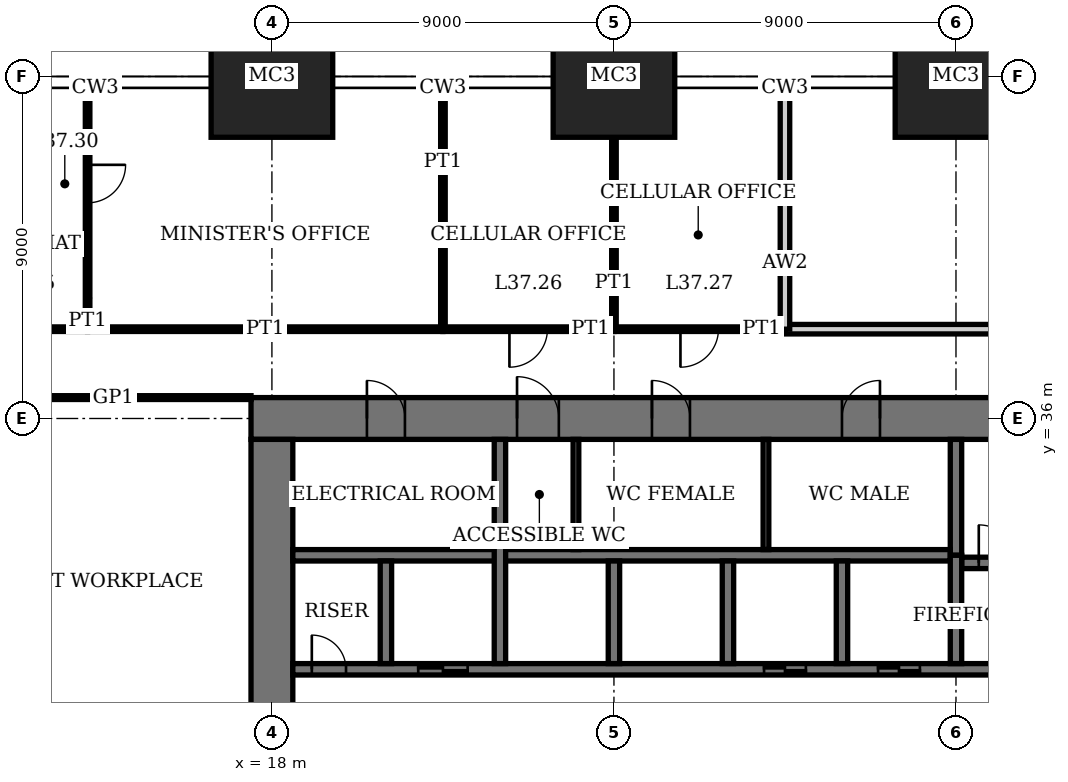
"""IFC4 building model, lengths in metres.
Left out: names, types, materials, properties, quantities, classifications, styles, units other than length and angle.
Written with IfcOpenShell. Run it as: python <this file> out.ifc"""

import sys

from ifc_helpers import new_model, si_unit, direction, frame, frame_2d, origin, origin_2d, place, context, subcontext, project, spatial, rectangle, extrude, element, fill, save


model = new_model("IFC4")
c1 = context("Model", 3, precision=1e-05, world=origin(), true_north=direction((0.0, 1.0)))
c2 = subcontext(c1, "Body", "Model", "MODEL_VIEW")
j1 = project(units=[si_unit("LENGTHUNIT", "METRE"), si_unit("PLANEANGLEUNIT", "RADIAN")], contexts=[c1])
p1 = place(None, origin())
s1 = spatial("IfcSite", under=j1, at=p1, CompositionType="ELEMENT")
p2 = place(p1, origin())
s2 = spatial("IfcBuilding", under=s1, at=p2, CompositionType="ELEMENT")
p3 = place(p2, frame((0.0, 0.0, 153.0)))
s3 = spatial("IfcBuildingStorey", under=s2, at=p3, CompositionType="ELEMENT", Elevation=153.0)
for number, where, z_axis, x_axis in (
    (1, (18.0, 45.0, 0.0), (0.0, 0.0, 1.0), (1.0, 0.0, 0.0)),
    (2, (27.0, 45.0, 0.0), (0.0, 0.0, 1.0), (1.0, 0.0, 0.0)),
    (3, (36.0, 45.0, 0.0), (0.0, 0.0, 1.0), (1.0, 0.0, 0.0)),
):
    element("IfcColumn", number, at=place(p3, frame(where, z_axis=z_axis, x_axis=x_axis)), inside=s3, PredefinedType="COLUMN", context=c2, shape_type="SweptSolid", body=[
        extrude(rectangle(XDim=3.2, YDim=3.2, at=origin_2d()), origin(), (0.0, 0.0, 1.0), 4.2),
    ])
p4 = place(p3, frame((45.55, 36.0, 0.0), z_axis=(0.0, 0.0, 1.0), x_axis=(-1.0, 0.0, 0.0)))
e4 = element("IfcWall", 4, at=p4, inside=s3, PredefinedType="SHEAR", context=c2, shape_type="SweptSolid", body=[
    extrude(rectangle(XDim=28.1, YDim=1.1, at=frame_2d((14.05, 0.0))), origin(), (0.0, 0.0, 1.0), 4.2),
])
p5 = place(p4, frame((11.55, 0.0, 0.0)))
e5 = element("IfcOpeningElement", 5, at=p5, cuts=e4, PredefinedType="OPENING", context=c2, shape_type="SweptSolid", body=[
    extrude(rectangle(XDim=1.0, YDim=2.4, at=frame_2d((0.5, 1.2))), frame((0.0, 0.56, 0.0), z_axis=(0.0, -1.0, 0.0), x_axis=(1.0, 0.0, 0.0)), (0.0, 0.0, 1.0), 1.12),
])
p6 = place(p4, frame((16.55, 0.0, 0.0)))
e6 = element("IfcOpeningElement", 6, at=p6, cuts=e4, PredefinedType="OPENING", context=c2, shape_type="SweptSolid", body=[
    extrude(rectangle(XDim=1.0, YDim=2.4, at=frame_2d((0.5, 1.2))), frame((0.0, 0.56, 0.0), z_axis=(0.0, -1.0, 0.0), x_axis=(1.0, 0.0, 0.0)), (0.0, 0.0, 1.0), 1.12),
])
p7 = place(p4, frame((20.0, 0.0, 0.0)))
e7 = element("IfcOpeningElement", 7, at=p7, cuts=e4, PredefinedType="OPENING", context=c2, shape_type="SweptSolid", body=[
    extrude(rectangle(XDim=1.1, YDim=2.4, at=frame_2d((0.55, 1.2))), frame((0.0, 0.56, 0.0), z_axis=(0.0, -1.0, 0.0), x_axis=(1.0, 0.0, 0.0)), (0.0, 0.0, 1.0), 1.12),
])
p8 = place(p4, frame((24.05, 0.0, 0.0)))
e8 = element("IfcOpeningElement", 8, at=p8, cuts=e4, PredefinedType="OPENING", context=c2, shape_type="SweptSolid", body=[
    extrude(rectangle(XDim=1.0, YDim=2.4, at=frame_2d((0.5, 1.2))), frame((0.0, 0.56, 0.0), z_axis=(0.0, -1.0, 0.0), x_axis=(1.0, 0.0, 0.0)), (0.0, 0.0, 1.0), 1.12),
])
p9 = place(p3, frame((18.0, 35.45, 0.0), z_axis=(0.0, 0.0, 1.0), x_axis=(0.0, -1.0, 0.0)))
e9 = element("IfcWall", 9, at=p9, inside=s3, PredefinedType="SHEAR", context=c2, shape_type="SweptSolid", body=[
    extrude(rectangle(XDim=16.9, YDim=1.1, at=frame_2d((8.45, 0.0))), origin(), (0.0, 0.0, 1.0), 4.2),
])
p10 = place(p9, frame((8.45, 0.0, 0.0)))
e10 = element("IfcOpeningElement", 10, at=p10, cuts=e9, PredefinedType="OPENING", context=c2, shape_type="SweptSolid", body=[
    extrude(rectangle(XDim=1.8, YDim=2.4, at=frame_2d((0.9, 1.2))), frame((0.0, 0.56, 0.0), z_axis=(0.0, -1.0, 0.0), x_axis=(1.0, 0.0, 0.0)), (0.0, 0.0, 1.0), 1.12),
])
p11 = place(p3, frame((36.15, 32.2, 0.0), z_axis=(0.0, 0.0, 1.0), x_axis=(1.0, 0.0, 0.0)))
e11 = element("IfcWall", 11, at=p11, inside=s3, PredefinedType="SHEAR", context=c2, shape_type="SweptSolid", body=[
    extrude(rectangle(XDim=8.3, YDim=0.3, at=frame_2d((4.15, 0.0))), origin(), (0.0, 0.0, 1.0), 4.2),
])
p12 = place(p11, frame((0.45, 0.0, 0.0)))
e12 = element("IfcOpeningElement", 12, at=p12, cuts=e11, PredefinedType="OPENING", context=c2, shape_type="SweptSolid", body=[
    extrude(rectangle(XDim=1.0, YDim=2.4, at=frame_2d((0.5, 1.2))), frame((0.0, 0.16, 0.0), z_axis=(0.0, -1.0, 0.0), x_axis=(1.0, 0.0, 0.0)), (0.0, 0.0, 1.0), 0.32),
])
p13 = place(p3, frame((36.0, 32.4, 0.0), z_axis=(0.0, 0.0, 1.0), x_axis=(0.0, 1.0, 0.0)))
e13 = element("IfcWall", 13, at=p13, inside=s3, PredefinedType="SHEAR", context=c2, shape_type="SweptSolid", body=[
    extrude(rectangle(XDim=3.05, YDim=0.3, at=frame_2d((1.525, 0.0))), origin(), (0.0, 0.0, 1.0), 4.2),
])
p14 = place(p3, frame((18.55, 29.4, 0.0), z_axis=(0.0, 0.0, 1.0), x_axis=(1.0, 0.0, 0.0)))
e14 = element("IfcWall", 14, at=p14, inside=s3, PredefinedType="SHEAR", context=c2, shape_type="SweptSolid", body=[
    extrude(rectangle(XDim=25.9, YDim=0.3, at=frame_2d((12.95, 0.0))), origin(), (0.0, 0.0, 1.0), 4.2),
])
p15 = place(p14, frame((19.95, 0.0, 0.0)))
e15 = element("IfcOpeningElement", 15, at=p15, cuts=e14, PredefinedType="OPENING", context=c2, shape_type="SweptSolid", body=[
    extrude(rectangle(XDim=1.0, YDim=2.4, at=frame_2d((0.5, 1.2))), frame((0.0, 0.16, 0.0), z_axis=(0.0, -1.0, 0.0), x_axis=(1.0, 0.0, 0.0)), (0.0, 0.0, 1.0), 0.32),
])
p16 = place(p14, frame((0.5, 0.0, 0.0)))
e16 = element("IfcOpeningElement", 16, at=p16, cuts=e14, PredefinedType="OPENING", context=c2, shape_type="SweptSolid", body=[
    extrude(rectangle(XDim=0.9, YDim=2.1, at=frame_2d((0.45, 1.05))), frame((0.0, 0.16, 0.0), z_axis=(0.0, -1.0, 0.0), x_axis=(1.0, 0.0, 0.0)), (0.0, 0.0, 1.0), 0.32),
])
p17 = place(p14, frame((15.4, 0.0, 0.0)))
e17 = element("IfcOpeningElement", 17, at=p17, cuts=e14, PredefinedType="OPENING", context=c2, shape_type="SweptSolid", body=[
    extrude(rectangle(XDim=1.1, YDim=2.4, at=frame_2d((0.55, 1.2))), frame((0.0, 0.16, 0.0), z_axis=(0.0, -1.0, 0.0), x_axis=(1.0, 0.0, 0.0)), (0.0, 0.0, 1.0), 0.32),
])
p18 = place(p14, frame((12.4, 0.0, 0.0)))
e18 = element("IfcOpeningElement", 18, at=p18, cuts=e14, PredefinedType="OPENING", context=c2, shape_type="SweptSolid", body=[
    extrude(rectangle(XDim=1.1, YDim=2.4, at=frame_2d((0.55, 1.2))), frame((0.0, 0.16, 0.0), z_axis=(0.0, -1.0, 0.0), x_axis=(1.0, 0.0, 0.0)), (0.0, 0.0, 1.0), 0.32),
])
p19 = place(p14, frame((3.3, 0.0, 0.0)))
e19 = element("IfcOpeningElement", 19, at=p19, cuts=e14, PredefinedType="OPENING", context=c2, shape_type="SweptSolid", body=[
    extrude(rectangle(XDim=1.3, YDim=2.4, at=frame_2d((0.65, 1.2))), frame((0.0, 0.16, 0.0), z_axis=(0.0, -1.0, 0.0), x_axis=(1.0, 0.0, 0.0)), (0.0, 0.0, 1.0), 0.32),
])
p20 = place(p3, frame((18.55, 32.4, 0.0), z_axis=(0.0, 0.0, 1.0), x_axis=(1.0, 0.0, 0.0)))
e20 = element("IfcWall", 20, at=p20, inside=s3, PredefinedType="SHEAR", context=c2, shape_type="SweptSolid", body=[
    extrude(rectangle(XDim=17.3, YDim=0.3, at=frame_2d((8.65, 0.0))), origin(), (0.0, 0.0, 1.0), 4.2),
])
for number, where, z_axis, x_axis in (
    (21, (33.0, 29.55, 0.0), (0.0, 0.0, 1.0), (0.0, 1.0, 0.0)),
    (22, (30.0, 29.55, 0.0), (0.0, 0.0, 1.0), (0.0, 1.0, 0.0)),
    (23, (27.0, 29.55, 0.0), (0.0, 0.0, 1.0), (0.0, 1.0, 0.0)),
):
    element("IfcWall", number, at=place(p3, frame(where, z_axis=z_axis, x_axis=x_axis)), inside=s3, PredefinedType="SHEAR", context=c2, shape_type="SweptSolid", body=[
        extrude(rectangle(XDim=2.7, YDim=0.3, at=frame_2d((1.35, 0.0))), origin(), (0.0, 0.0, 1.0), 4.2),
    ])
p21 = place(p3, frame((24.0, 29.55, 0.0), z_axis=(0.0, 0.0, 1.0), x_axis=(0.0, 1.0, 0.0)))
e24 = element("IfcWall", 24, at=p21, inside=s3, PredefinedType="SHEAR", context=c2, shape_type="SweptSolid", body=[
    extrude(rectangle(XDim=5.9, YDim=0.3, at=frame_2d((2.95, 0.0))), origin(), (0.0, 0.0, 1.0), 4.2),
])
p22 = place(p3, frame((21.0, 29.55, 0.0), z_axis=(0.0, 0.0, 1.0), x_axis=(0.0, 1.0, 0.0)))
e25 = element("IfcWall", 25, at=p22, inside=s3, PredefinedType="SHEAR", context=c2, shape_type="SweptSolid", body=[
    extrude(rectangle(XDim=2.7, YDim=0.3, at=frame_2d((1.35, 0.0))), origin(), (0.0, 0.0, 1.0), 4.2),
])
p23 = place(p3, frame((36.0, 29.55, 0.0), z_axis=(0.0, 0.0, 1.0), x_axis=(0.0, 1.0, 0.0)))
e26 = element("IfcWall", 26, at=p23, inside=s3, PredefinedType="SHEAR", context=c2, shape_type="SweptSolid", body=[
    extrude(rectangle(XDim=2.85, YDim=0.3, at=frame_2d((1.425, 0.0))), origin(), (0.0, 0.0, 1.0), 4.2),
])
p24 = place(p3, frame((10.0, 36.55, 0.0), z_axis=(0.0, 0.0, 1.0), x_axis=(1.0, 0.0, 0.0)))
e27 = element("IfcWall", 27, at=p24, inside=s3, PredefinedType="PARTITIONING", context=c2, shape_type="SweptSolid", body=[
    extrude(rectangle(XDim=7.45, YDim=0.1, at=frame_2d((3.725, 0.0))), origin(), (0.0, 0.0, 1.0), 3.85),
])
p25 = place(p3, frame((31.5, 38.35, 0.0), z_axis=(0.0, 0.0, 1.0), x_axis=(1.0, 0.0, 0.0)))
e28 = element("IfcWall", 28, at=p25, inside=s3, PredefinedType="PARTITIONING", context=c2, shape_type="SweptSolid", body=[
    extrude(rectangle(XDim=13.5, YDim=0.25, at=frame_2d((6.75, 0.0))), origin(), (0.0, 0.0, 1.0), 3.85),
])
p26 = place(p25, frame((5.85, 0.0, 0.0)))
e29 = element("IfcOpeningElement", 29, at=p26, cuts=e28, PredefinedType="OPENING", context=c2, shape_type="SweptSolid", body=[
    extrude(rectangle(XDim=1.8, YDim=2.4, at=frame_2d((0.9, 1.2))), frame((0.0, 0.135, 0.0), z_axis=(0.0, -1.0, 0.0), x_axis=(1.0, 0.0, 0.0)), (0.0, 0.0, 1.0), 0.27),
])
p27 = place(p3, frame((9.0, 38.35, 0.0), z_axis=(0.0, 0.0, 1.0), x_axis=(1.0, 0.0, 0.0)))
e30 = element("IfcWall", 30, at=p27, inside=s3, PredefinedType="PARTITIONING", context=c2, shape_type="SweptSolid", body=[
    extrude(rectangle(XDim=4.15, YDim=0.12, at=frame_2d((2.075, 0.0))), origin(), (0.0, 0.0, 1.0), 3.85),
])
p28 = place(p27, frame((1.575, 0.0, 0.0)))
e31 = element("IfcOpeningElement", 31, at=p28, cuts=e30, PredefinedType="OPENING", context=c2, shape_type="SweptSolid", body=[
    extrude(rectangle(XDim=1.0, YDim=2.4, at=frame_2d((0.5, 1.2))), frame((0.0, 0.07, 0.0), z_axis=(0.0, -1.0, 0.0), x_axis=(1.0, 0.0, 0.0)), (0.0, 0.0, 1.0), 0.14),
])
p29 = place(p3, frame((13.15, 38.35, 0.0), z_axis=(0.0, 0.0, 1.0), x_axis=(1.0, 0.0, 0.0)))
e32 = element("IfcWall", 32, at=p29, inside=s3, PredefinedType="PARTITIONING", context=c2, shape_type="SweptSolid", body=[
    extrude(rectangle(XDim=9.35, YDim=0.12, at=frame_2d((4.675, 0.0))), origin(), (0.0, 0.0, 1.0), 3.85),
])
p30 = place(p3, frame((22.5, 38.35, 0.0), z_axis=(0.0, 0.0, 1.0), x_axis=(1.0, 0.0, 0.0)))
e33 = element("IfcWall", 33, at=p30, inside=s3, PredefinedType="PARTITIONING", context=c2, shape_type="SweptSolid", body=[
    extrude(rectangle(XDim=4.5, YDim=0.12, at=frame_2d((2.25, 0.0))), origin(), (0.0, 0.0, 1.0), 3.85),
])
p31 = place(p30, frame((1.75, 0.0, 0.0)))
e34 = element("IfcOpeningElement", 34, at=p31, cuts=e33, PredefinedType="OPENING", context=c2, shape_type="SweptSolid", body=[
    extrude(rectangle(XDim=1.0, YDim=2.4, at=frame_2d((0.5, 1.2))), frame((0.0, 0.07, 0.0), z_axis=(0.0, -1.0, 0.0), x_axis=(1.0, 0.0, 0.0)), (0.0, 0.0, 1.0), 0.14),
])
p32 = place(p3, frame((27.0, 38.35, 0.0), z_axis=(0.0, 0.0, 1.0), x_axis=(1.0, 0.0, 0.0)))
e35 = element("IfcWall", 35, at=p32, inside=s3, PredefinedType="PARTITIONING", context=c2, shape_type="SweptSolid", body=[
    extrude(rectangle(XDim=4.5, YDim=0.12, at=frame_2d((2.25, 0.0))), origin(), (0.0, 0.0, 1.0), 3.85),
])
p33 = place(p32, frame((1.75, 0.0, 0.0)))
e36 = element("IfcOpeningElement", 36, at=p33, cuts=e35, PredefinedType="OPENING", context=c2, shape_type="SweptSolid", body=[
    extrude(rectangle(XDim=1.0, YDim=2.4, at=frame_2d((0.5, 1.2))), frame((0.0, 0.07, 0.0), z_axis=(0.0, -1.0, 0.0), x_axis=(1.0, 0.0, 0.0)), (0.0, 0.0, 1.0), 0.14),
])
p34 = place(p3, frame((13.15, 38.35, 0.0), z_axis=(0.0, 0.0, 1.0), x_axis=(0.0, 1.0, 0.0)))
e37 = element("IfcWall", 37, at=p34, inside=s3, PredefinedType="PARTITIONING", context=c2, shape_type="SweptSolid", body=[
    extrude(rectangle(XDim=6.34, YDim=0.12, at=frame_2d((3.17, 0.0))), origin(), (0.0, 0.0, 1.0), 3.85),
])
p35 = place(p34, frame((3.325, 0.0, 0.0)))
e38 = element("IfcOpeningElement", 38, at=p35, cuts=e37, PredefinedType="OPENING", context=c2, shape_type="SweptSolid", body=[
    extrude(rectangle(XDim=1.0, YDim=2.4, at=frame_2d((0.5, 1.2))), frame((0.0, 0.07, 0.0), z_axis=(0.0, -1.0, 0.0), x_axis=(1.0, 0.0, 0.0)), (0.0, 0.0, 1.0), 0.14),
])
p36 = place(p3, frame((22.5, 38.35, 0.0), z_axis=(0.0, 0.0, 1.0), x_axis=(0.0, 1.0, 0.0)))
e39 = element("IfcWall", 39, at=p36, inside=s3, PredefinedType="PARTITIONING", context=c2, shape_type="SweptSolid", body=[
    extrude(rectangle(XDim=6.34, YDim=0.12, at=frame_2d((3.17, 0.0))), origin(), (0.0, 0.0, 1.0), 3.85),
])
p37 = place(p3, frame((27.0, 38.35, 0.0), z_axis=(0.0, 0.0, 1.0), x_axis=(0.0, 1.0, 0.0)))
e40 = element("IfcWall", 40, at=p37, inside=s3, PredefinedType="PARTITIONING", context=c2, shape_type="SweptSolid", body=[
    extrude(rectangle(XDim=5.05, YDim=0.12, at=frame_2d((2.525, 0.0))), origin(), (0.0, 0.0, 1.0), 3.25),
])
p38 = place(p3, frame((31.5, 38.35, 0.0), z_axis=(0.0, 0.0, 1.0), x_axis=(0.0, 1.0, 0.0)))
e41 = element("IfcWall", 41, at=p38, inside=s3, PredefinedType="PARTITIONING", context=c2, shape_type="SweptSolid", body=[
    extrude(rectangle(XDim=6.34, YDim=0.25, at=frame_2d((3.17, 0.0))), origin(), (0.0, 0.0, 1.0), 3.85),
])
for number, where, z_axis, x_axis in (
    (42, (31.0, 32.55, 0.0), (0.0, 0.0, 1.0), (0.0, 1.0, 0.0)),
    (43, (26.0, 32.55, 0.0), (0.0, 0.0, 1.0), (0.0, 1.0, 0.0)),
):
    element("IfcWall", number, at=place(p3, frame(where, z_axis=z_axis, x_axis=x_axis)), inside=s3, PredefinedType="PARTITIONING", context=c2, shape_type="SweptSolid", body=[
        extrude(rectangle(XDim=2.9, YDim=0.15, at=frame_2d((1.45, 0.0))), origin(), (0.0, 0.0, 1.0), 3.85),
    ])
p39 = place(p5, origin())
e44 = element("IfcDoor", 44, at=p39, inside=s3, OperationType="SINGLE_SWING_LEFT", PredefinedType="DOOR", context=c2, shape_type="SweptSolid", body=[
    extrude(rectangle(XDim=1.0, YDim=2.4, at=frame_2d((0.5, 1.2))), frame((0.0, 0.025, 0.0), z_axis=(0.0, -1.0, 0.0), x_axis=(1.0, 0.0, 0.0)), (0.0, 0.0, 1.0), 0.05),
    extrude(rectangle(XDim=0.04, YDim=2.4, at=frame_2d((0.02, 1.2))), frame((0.0, 0.4, 0.0), z_axis=(0.0, -1.0, 0.0), x_axis=(1.0, 0.0, 0.0)), (0.0, 0.0, 1.0), 0.8),
    extrude(rectangle(XDim=0.04, YDim=2.4, at=frame_2d((0.98, 1.2))), frame((0.0, 0.4, 0.0), z_axis=(0.0, -1.0, 0.0), x_axis=(1.0, 0.0, 0.0)), (0.0, 0.0, 1.0), 0.8),
    extrude(rectangle(XDim=1.0, YDim=0.04, at=frame_2d((0.5, 2.38))), frame((0.0, 0.4, 0.0), z_axis=(0.0, -1.0, 0.0), x_axis=(1.0, 0.0, 0.0)), (0.0, 0.0, 1.0), 0.8),
])
fill(e5, e44)
p40 = place(p6, origin())
e45 = element("IfcDoor", 45, at=p40, inside=s3, OperationType="SINGLE_SWING_RIGHT", PredefinedType="DOOR", context=c2, shape_type="SweptSolid", body=[
    extrude(rectangle(XDim=1.0, YDim=2.4, at=frame_2d((0.5, 1.2))), frame((0.0, 0.025, 0.0), z_axis=(0.0, -1.0, 0.0), x_axis=(1.0, 0.0, 0.0)), (0.0, 0.0, 1.0), 0.05),
    extrude(rectangle(XDim=0.04, YDim=2.4, at=frame_2d((0.02, 1.2))), frame((0.0, 0.4, 0.0), z_axis=(0.0, -1.0, 0.0), x_axis=(1.0, 0.0, 0.0)), (0.0, 0.0, 1.0), 0.8),
    extrude(rectangle(XDim=0.04, YDim=2.4, at=frame_2d((0.98, 1.2))), frame((0.0, 0.4, 0.0), z_axis=(0.0, -1.0, 0.0), x_axis=(1.0, 0.0, 0.0)), (0.0, 0.0, 1.0), 0.8),
    extrude(rectangle(XDim=1.0, YDim=0.04, at=frame_2d((0.5, 2.38))), frame((0.0, 0.4, 0.0), z_axis=(0.0, -1.0, 0.0), x_axis=(1.0, 0.0, 0.0)), (0.0, 0.0, 1.0), 0.8),
])
fill(e6, e45)
p41 = place(p7, origin())
e46 = element("IfcDoor", 46, at=p41, inside=s3, OperationType="SINGLE_SWING_RIGHT", PredefinedType="DOOR", context=c2, shape_type="SweptSolid", body=[
    extrude(rectangle(XDim=1.1, YDim=2.4, at=frame_2d((0.55, 1.2))), frame((0.0, 0.025, 0.0), z_axis=(0.0, -1.0, 0.0), x_axis=(1.0, 0.0, 0.0)), (0.0, 0.0, 1.0), 0.05),
    extrude(rectangle(XDim=0.04, YDim=2.4, at=frame_2d((0.02, 1.2))), frame((0.0, 0.44, 0.0), z_axis=(0.0, -1.0, 0.0), x_axis=(1.0, 0.0, 0.0)), (0.0, 0.0, 1.0), 0.88),
    extrude(rectangle(XDim=0.04, YDim=2.4, at=frame_2d((1.08, 1.2))), frame((0.0, 0.44, 0.0), z_axis=(0.0, -1.0, 0.0), x_axis=(1.0, 0.0, 0.0)), (0.0, 0.0, 1.0), 0.88),
    extrude(rectangle(XDim=1.1, YDim=0.04, at=frame_2d((0.55, 2.38))), frame((0.0, 0.44, 0.0), z_axis=(0.0, -1.0, 0.0), x_axis=(1.0, 0.0, 0.0)), (0.0, 0.0, 1.0), 0.88),
])
fill(e7, e46)
p42 = place(p8, origin())
e47 = element("IfcDoor", 47, at=p42, inside=s3, OperationType="SINGLE_SWING_RIGHT", PredefinedType="DOOR", context=c2, shape_type="SweptSolid", body=[
    extrude(rectangle(XDim=1.0, YDim=2.4, at=frame_2d((0.5, 1.2))), frame((0.0, 0.025, 0.0), z_axis=(0.0, -1.0, 0.0), x_axis=(1.0, 0.0, 0.0)), (0.0, 0.0, 1.0), 0.05),
    extrude(rectangle(XDim=0.04, YDim=2.4, at=frame_2d((0.02, 1.2))), frame((0.0, 0.4, 0.0), z_axis=(0.0, -1.0, 0.0), x_axis=(1.0, 0.0, 0.0)), (0.0, 0.0, 1.0), 0.8),
    extrude(rectangle(XDim=0.04, YDim=2.4, at=frame_2d((0.98, 1.2))), frame((0.0, 0.4, 0.0), z_axis=(0.0, -1.0, 0.0), x_axis=(1.0, 0.0, 0.0)), (0.0, 0.0, 1.0), 0.8),
    extrude(rectangle(XDim=1.0, YDim=0.04, at=frame_2d((0.5, 2.38))), frame((0.0, 0.4, 0.0), z_axis=(0.0, -1.0, 0.0), x_axis=(1.0, 0.0, 0.0)), (0.0, 0.0, 1.0), 0.8),
])
fill(e8, e47)
p43 = place(p12, origin())
e48 = element("IfcDoor", 48, at=p43, inside=s3, OperationType="SINGLE_SWING_RIGHT", PredefinedType="DOOR", context=c2, shape_type="SweptSolid", body=[
    extrude(rectangle(XDim=1.0, YDim=2.4, at=frame_2d((0.5, 1.2))), frame((0.0, 0.03, 0.0), z_axis=(0.0, -1.0, 0.0), x_axis=(1.0, 0.0, 0.0)), (0.0, 0.0, 1.0), 0.06),
])
fill(e12, e48)
p44 = place(p16, origin())
e49 = element("IfcDoor", 49, at=p44, inside=s3, OperationType="SINGLE_SWING_RIGHT", PredefinedType="DOOR", context=c2, shape_type="SweptSolid", body=[
    extrude(rectangle(XDim=0.9, YDim=2.1, at=frame_2d((0.45, 1.05))), frame((0.0, 0.03, 0.0), z_axis=(0.0, -1.0, 0.0), x_axis=(1.0, 0.0, 0.0)), (0.0, 0.0, 1.0), 0.06),
])
fill(e16, e49)
p45 = place(p31, origin())
e50 = element("IfcDoor", 50, at=p45, inside=s3, OperationType="SINGLE_SWING_LEFT", PredefinedType="DOOR", context=c2, shape_type="SweptSolid", body=[
    extrude(rectangle(XDim=1.0, YDim=2.4, at=frame_2d((0.5, 1.2))), frame((0.0, 0.025, 0.0), z_axis=(0.0, -1.0, 0.0), x_axis=(1.0, 0.0, 0.0)), (0.0, 0.0, 1.0), 0.05),
])
fill(e34, e50)
p46 = place(p33, origin())
e51 = element("IfcDoor", 51, at=p46, inside=s3, OperationType="SINGLE_SWING_LEFT", PredefinedType="DOOR", context=c2, shape_type="SweptSolid", body=[
    extrude(rectangle(XDim=1.0, YDim=2.4, at=frame_2d((0.5, 1.2))), frame((0.0, 0.025, 0.0), z_axis=(0.0, -1.0, 0.0), x_axis=(1.0, 0.0, 0.0)), (0.0, 0.0, 1.0), 0.05),
])
fill(e36, e51)
p47 = place(p35, origin())
e52 = element("IfcDoor", 52, at=p47, inside=s3, OperationType="SINGLE_SWING_RIGHT", PredefinedType="DOOR", context=c2, shape_type="SweptSolid", body=[
    extrude(rectangle(XDim=1.0, YDim=2.4, at=frame_2d((0.5, 1.2))), frame((0.0, 0.025, 0.0), z_axis=(0.0, -1.0, 0.0), x_axis=(1.0, 0.0, 0.0)), (0.0, 0.0, 1.0), 0.05),
])
fill(e38, e52)
p48 = place(p17, origin())
e53 = element("IfcDoor", 53, at=p48, inside=s3, OperationType="DOUBLE_DOOR_SLIDING", PredefinedType="DOOR", context=c2, shape_type="SweptSolid", body=[
    extrude(rectangle(XDim=1.1, YDim=2.4, at=frame_2d((0.55, 1.2))), frame((0.0, 0.02, 0.0), z_axis=(0.0, -1.0, 0.0), x_axis=(1.0, 0.0, 0.0)), (0.0, 0.0, 1.0), 0.04),
])
fill(e17, e53)
p49 = place(p18, origin())
e54 = element("IfcDoor", 54, at=p49, inside=s3, OperationType="DOUBLE_DOOR_SLIDING", PredefinedType="DOOR", context=c2, shape_type="SweptSolid", body=[
    extrude(rectangle(XDim=1.1, YDim=2.4, at=frame_2d((0.55, 1.2))), frame((0.0, 0.02, 0.0), z_axis=(0.0, -1.0, 0.0), x_axis=(1.0, 0.0, 0.0)), (0.0, 0.0, 1.0), 0.04),
])
fill(e18, e54)
p50 = place(p19, origin())
e55 = element("IfcDoor", 55, at=p50, inside=s3, OperationType="DOUBLE_DOOR_SLIDING", PredefinedType="DOOR", context=c2, shape_type="SweptSolid", body=[
    extrude(rectangle(XDim=1.3, YDim=2.4, at=frame_2d((0.65, 1.2))), frame((0.0, 0.02, 0.0), z_axis=(0.0, -1.0, 0.0), x_axis=(1.0, 0.0, 0.0)), (0.0, 0.0, 1.0), 0.04),
])
fill(e19, e55)
save(model, sys.argv[1])
